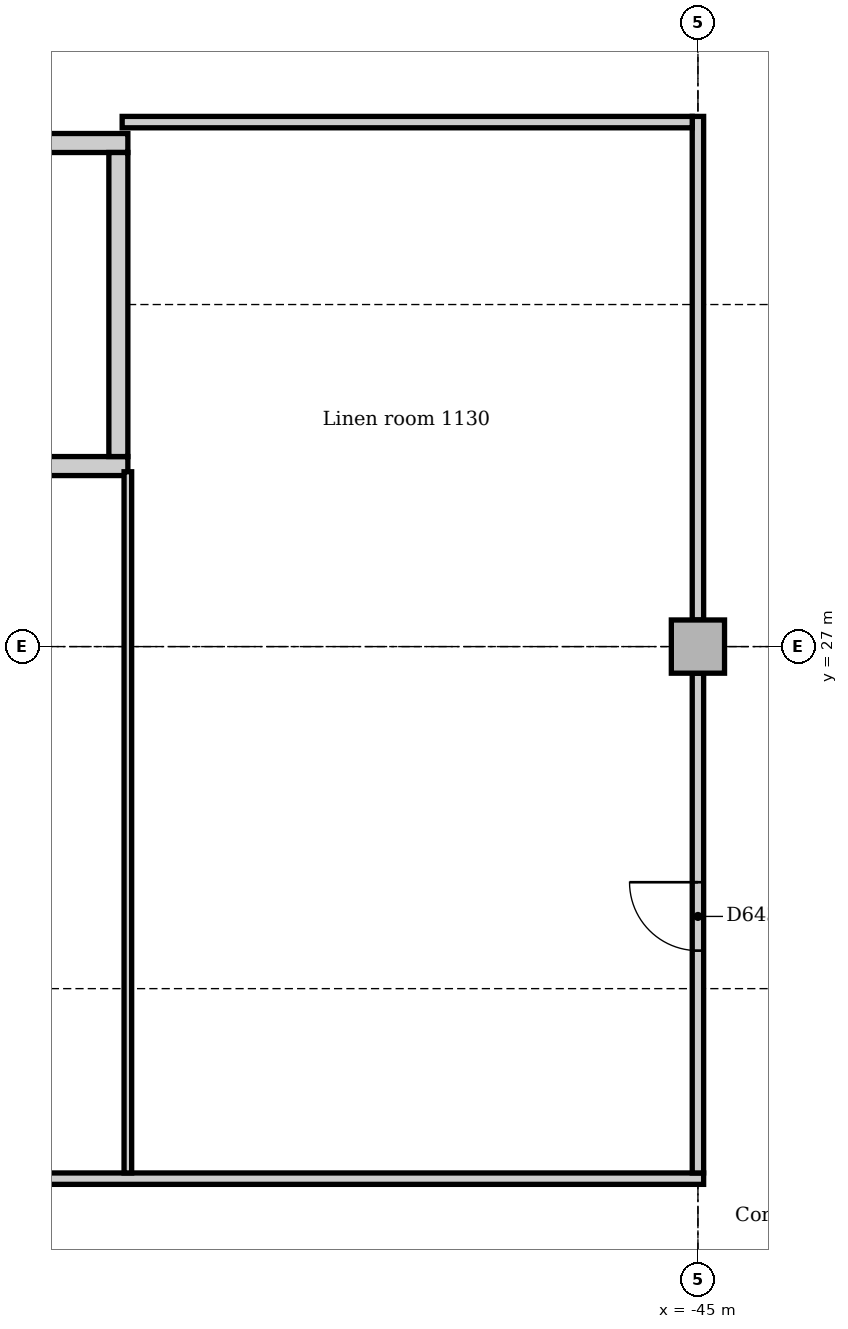
"""IFC4 building model, lengths in metres.
Left out: names, types, materials, properties, quantities, classifications, styles, units other than length and angle.
Written with IfcOpenShell. Run it as: python <this file> out.ifc"""

import sys

from ifc_helpers import new_model, si_unit, direction, frame, frame_2d, origin, origin_2d, place, context, subcontext, project, spatial, rectangle, extrude, element, fill, save


model = new_model("IFC4")
c1 = context("Model", 3, precision=1e-05, world=origin(), true_north=direction((0.0, 1.0)))
c2 = subcontext(c1, "Body", "Model", "MODEL_VIEW")
j1 = project(units=[si_unit("LENGTHUNIT", "METRE"), si_unit("PLANEANGLEUNIT", "RADIAN")], contexts=[c1])
p1 = place(None, origin())
s1 = spatial("IfcSite", under=j1, at=p1, CompositionType="ELEMENT")
p2 = place(p1, origin())
s2 = spatial("IfcBuilding", under=s1, at=p2, CompositionType="ELEMENT")
p3 = place(p2, frame((0.0, 0.0, 51.0)))
s3 = spatial("IfcBuildingStorey", under=s2, at=p3, CompositionType="ELEMENT", Elevation=51.0)
p4 = place(p3, frame((-60.0, 29.375, 0.0), z_axis=(0.0, 0.0, 1.0), x_axis=(1.0, 0.0, 0.0)))
e1 = element("IfcWall", 1, at=p4, inside=s3, PredefinedType="SOLIDWALL", context=c2, shape_type="SweptSolid", body=[
    extrude(rectangle(XDim=7.5, YDim=0.25, at=frame_2d((3.75, 0.0))), origin(), (0.0, 0.0, 1.0), 4.0),
])
p5 = place(p3, frame((-52.5, 33.625, 0.0), z_axis=(0.0, 0.0, 1.0), x_axis=(-1.0, 0.0, 0.0)))
e2 = element("IfcWall", 2, at=p5, inside=s3, PredefinedType="SOLIDWALL", context=c2, shape_type="SweptSolid", body=[
    extrude(rectangle(XDim=7.5, YDim=0.25, at=frame_2d((3.75, 0.0))), origin(), (0.0, 0.0, 1.0), 4.0),
])
p6 = place(p5, frame((6.0, 0.0, 0.0)))
e3 = element("IfcOpeningElement", 3, at=p6, cuts=e2, PredefinedType="OPENING", context=c2, shape_type="SweptSolid", body=[
    extrude(rectangle(XDim=1.0, YDim=2.1, at=frame_2d((0.5, 1.05))), frame((0.0, 0.135, 0.0), z_axis=(0.0, -1.0, 0.0), x_axis=(1.0, 0.0, 0.0)), (0.0, 0.0, 1.0), 0.27),
])
p7 = place(p3, frame((-52.625, 29.5, 0.0), z_axis=(0.0, 0.0, 1.0), x_axis=(0.0, 1.0, 0.0)))
e4 = element("IfcWall", 4, at=p7, inside=s3, PredefinedType="SOLIDWALL", context=c2, shape_type="SweptSolid", body=[
    extrude(rectangle(XDim=4.0, YDim=0.25, at=frame_2d((2.0, 0.0))), origin(), (0.0, 0.0, 1.0), 4.0),
])
p8 = place(p3, frame((-45.0, 27.0, 0.0), z_axis=(0.0, 0.0, 1.0), x_axis=(1.0, 0.0, 0.0)))
e5 = element("IfcColumn", 5, at=p8, inside=s3, PredefinedType="COLUMN", context=c2, shape_type="SweptSolid", body=[
    extrude(rectangle(XDim=0.7, YDim=0.7, at=origin_2d()), origin(), (0.0, 0.0, 1.0), 3.85),
])
p9 = place(p3, frame((-64.89, 20.0, 0.0), z_axis=(0.0, 0.0, 1.0), x_axis=(1.0, 0.0, 0.0)))
e6 = element("IfcWall", 6, at=p9, inside=s3, PredefinedType="PARTITIONING", context=c2, shape_type="SweptSolid", body=[
    extrude(rectangle(XDim=19.965, YDim=0.15, at=frame_2d((9.982, 0.0))), origin(), (0.0, 0.0, 1.0), 3.85),
])
p10 = place(p9, frame((2.35, 0.0, 0.0)))
e7 = element("IfcOpeningElement", 7, at=p10, cuts=e6, PredefinedType="OPENING", context=c2, shape_type="SweptSolid", body=[
    extrude(rectangle(XDim=0.9, YDim=2.1, at=frame_2d((0.45, 1.05))), frame((0.0, 0.085, 0.0), z_axis=(0.0, -1.0, 0.0), x_axis=(1.0, 0.0, 0.0)), (0.0, 0.0, 1.0), 0.17),
])
p11 = place(p9, frame((8.19, 0.0, 0.0)))
e8 = element("IfcOpeningElement", 8, at=p11, cuts=e6, PredefinedType="OPENING", context=c2, shape_type="SweptSolid", body=[
    extrude(rectangle(XDim=0.9, YDim=2.1, at=frame_2d((0.45, 1.05))), frame((0.0, 0.085, 0.0), z_axis=(0.0, -1.0, 0.0), x_axis=(1.0, 0.0, 0.0)), (0.0, 0.0, 1.0), 0.17),
])
p12 = place(p3, frame((-45.0, 20.075, 0.0), z_axis=(0.0, 0.0, 1.0), x_axis=(0.0, 1.0, 0.0)))
e9 = element("IfcWall", 9, at=p12, inside=s3, PredefinedType="PARTITIONING", context=c2, shape_type="SweptSolid", body=[
    extrude(rectangle(XDim=6.575, YDim=0.15, at=frame_2d((3.288, 0.0))), origin(), (0.0, 0.0, 1.0), 3.256),
])
p13 = place(p12, frame((2.925, 0.0, 0.0)))
e10 = element("IfcOpeningElement", 10, at=p13, cuts=e9, PredefinedType="OPENING", context=c2, shape_type="SweptSolid", body=[
    extrude(rectangle(XDim=0.9, YDim=2.1, at=frame_2d((0.45, 1.05))), frame((0.0, 0.085, 0.0), z_axis=(0.0, -1.0, 0.0), x_axis=(1.0, 0.0, 0.0)), (0.0, 0.0, 1.0), 0.17),
])
p14 = place(p3, frame((-45.0, 27.35, 0.0), z_axis=(0.0, 0.0, 1.0), x_axis=(0.0, 1.0, 0.0)))
e11 = element("IfcWall", 11, at=p14, inside=s3, PredefinedType="PARTITIONING", context=c2, shape_type="SweptSolid", body=[
    extrude(rectangle(XDim=6.625, YDim=0.15, at=frame_2d((3.312, 0.0))), origin(), (0.0, 0.0, 1.0), 3.256),
])
p15 = place(p3, frame((-52.575, 33.9, 0.0), z_axis=(0.0, 0.0, 1.0), x_axis=(1.0, 0.0, 0.0)))
e12 = element("IfcWall", 12, at=p15, inside=s3, PredefinedType="PARTITIONING", context=c2, shape_type="SweptSolid", body=[
    extrude(rectangle(XDim=7.5, YDim=0.15, at=frame_2d((3.75, 0.0))), origin(), (0.0, 0.0, 1.0), 3.85),
])
p16 = place(p3, frame((-52.5, 20.075, 0.0), z_axis=(0.0, 0.0, 1.0), x_axis=(0.0, 1.0, 0.0)))
e13 = element("IfcWall", 13, at=p16, inside=s3, PredefinedType="PARTITIONING", context=c2, shape_type="SweptSolid", body=[
    extrude(rectangle(XDim=9.225, YDim=0.1, at=frame_2d((4.612, 0.0))), origin(), (0.0, 0.0, 1.0), 3.85),
])
p17 = place(p13, origin())
e14 = element("IfcDoor", 14, at=p17, inside=s3, OperationType="SINGLE_SWING_RIGHT", PredefinedType="DOOR", context=c2, shape_type="SweptSolid", body=[
    extrude(rectangle(XDim=0.9, YDim=2.1, at=frame_2d((0.45, 1.05))), frame((0.0, 0.025, 0.0), z_axis=(0.0, -1.0, 0.0), x_axis=(1.0, 0.0, 0.0)), (0.0, 0.0, 1.0), 0.05),
])
fill(e10, e14)
save(model, sys.argv[1])
